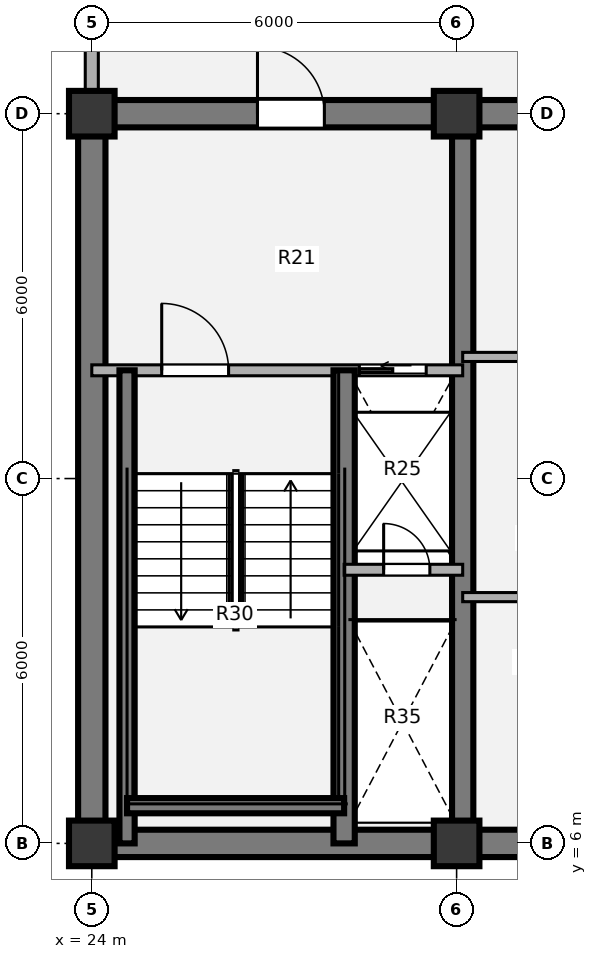
"""IFC4 building model, lengths in metres.
Left out: names, types, materials, properties, quantities, classifications, styles, units other than length and angle.
Written with IfcOpenShell. Run it as: python <this file> out.ifc"""

import sys

from ifc_helpers import new_model, si_unit, direction, frame, frame_2d, origin, origin_2d, place, context, subcontext, project, spatial, rectangle, extrude, source, transform, mapped, element, fill, save


model = new_model("IFC4")
c1 = context("Model", 3, precision=1e-05, world=origin(), true_north=direction((0.0, 1.0)))
c2 = subcontext(c1, "Body", "Model", "MODEL_VIEW")
j1 = project(units=[si_unit("LENGTHUNIT", "METRE"), si_unit("PLANEANGLEUNIT", "RADIAN")], contexts=[c1])
p1 = place(None, origin())
s1 = spatial("IfcSite", under=j1, at=p1, CompositionType="ELEMENT")
p2 = place(p1, origin())
s2 = spatial("IfcBuilding", under=s1, at=p2, CompositionType="ELEMENT")
p3 = place(p2, frame((0.0, 0.0, 182.88)))
s3 = spatial("IfcBuildingStorey", under=s2, at=p3, CompositionType="ELEMENT", Elevation=182.88)
m1 = source(origin(), c2, "Body", "SweptSolid", [
    extrude(rectangle(XDim=0.75, YDim=0.75, at=origin_2d()), origin(), (0.0, 0.0, 1.0), 3.78),
])
for number, where, z_axis, x_axis in (
    (1, (24.0, 6.0, 0.0), (0.0, 0.0, 1.0), (1.0, 0.0, 0.0)),
    (2, (30.0, 6.0, 0.0), (0.0, 0.0, 1.0), (1.0, 0.0, 0.0)),
    (3, (24.0, 18.0, 0.0), (0.0, 0.0, 1.0), (1.0, 0.0, 0.0)),
    (4, (30.0, 18.0, 0.0), (0.0, 0.0, 1.0), (1.0, 0.0, 0.0)),
):
    element("IfcColumn", number, at=place(p3, frame(where, z_axis=z_axis, x_axis=x_axis)), inside=s3, PredefinedType="COLUMN", context=c2, shape_type="MappedRepresentation", body=[
        mapped(m1, transform((0.0, 0.0, 0.0), x_axis=(1.0, 0.0, 0.0), y_axis=(0.0, 1.0, 0.0), z_axis=(0.0, 0.0, 1.0), scale=1.0)),
    ])
p4 = place(p3, frame((48.225, 6.0, 0.0), z_axis=(0.0, 0.0, 1.0), x_axis=(-1.0, 0.0, 0.0)))
e5 = element("IfcWall", 5, at=p4, inside=s3, PredefinedType="SHEAR", context=c2, shape_type="SweptSolid", body=[
    extrude(rectangle(XDim=24.45, YDim=0.45, at=frame_2d((12.225, 0.0))), origin(), (0.0, 0.0, 1.0), 3.78),
])
p5 = place(p3, frame((24.0, 6.0, 0.0), z_axis=(0.0, 0.0, 1.0), x_axis=(0.0, 1.0, 0.0)))
e6 = element("IfcWall", 6, at=p5, inside=s3, PredefinedType="SHEAR", context=c2, shape_type="SweptSolid", body=[
    extrude(rectangle(XDim=12.0, YDim=0.45, at=frame_2d((6.0, 0.0))), origin(), (0.0, 0.0, 1.0), 3.78),
])
p6 = place(p3, frame((23.775, 18.0, 0.0), z_axis=(0.0, 0.0, 1.0), x_axis=(1.0, 0.0, 0.0)))
e7 = element("IfcWall", 7, at=p6, inside=s3, PredefinedType="SHEAR", context=c2, shape_type="SweptSolid", body=[
    extrude(rectangle(XDim=9.425, YDim=0.45, at=frame_2d((4.712, 0.0))), origin(), (0.0, 0.0, 1.0), 3.78),
])
p7 = place(p6, frame((2.95, 0.0, 0.0)))
e8 = element("IfcOpeningElement", 8, at=p7, cuts=e7, PredefinedType="OPENING", context=c2, shape_type="SweptSolid", body=[
    extrude(rectangle(XDim=1.1, YDim=2.1, at=origin_2d()), frame((0.55, 0.235, 1.05), z_axis=(0.0, -1.0, 0.0), x_axis=(1.0, 0.0, 0.0)), (0.0, 0.0, 1.0), 0.47),
])
p8 = place(p3, frame((30.1, 6.0, 0.0), z_axis=(0.0, 0.0, 1.0), x_axis=(0.0, 1.0, 0.0)))
e9 = element("IfcWall", 9, at=p8, inside=s3, PredefinedType="SHEAR", context=c2, shape_type="SweptSolid", body=[
    extrude(rectangle(XDim=12.0, YDim=0.35, at=frame_2d((6.0, 0.0))), origin(), (0.0, 0.0, 1.0), 3.78),
])
p9 = place(p3, frame((24.0, 18.355, 0.0), z_axis=(0.0, 0.0, 1.0), x_axis=(0.0, 1.0, 0.0)))
e10 = element("IfcWall", 10, at=p9, inside=s3, PredefinedType="SOLIDWALL", context=c2, shape_type="SweptSolid", body=[
    extrude(rectangle(XDim=2.695, YDim=0.215, at=frame_2d((1.348, 0.0))), origin(), (0.0, 0.0, 1.0), 2.718),
])
for number, where, z_axis, x_axis in (
    (11, (30.1, 14.0, 0.0), (0.0, 0.0, 1.0), (1.0, 0.0, 0.0)),
    (12, (30.1, 10.05, 0.0), (0.0, 0.0, 1.0), (1.0, 0.0, 0.0)),
):
    element("IfcWall", number, at=place(p3, frame(where, z_axis=z_axis, x_axis=x_axis)), inside=s3, PredefinedType="PARTITIONING", context=c2, shape_type="SweptSolid", body=[
        extrude(rectangle(XDim=2.5, YDim=0.15, at=frame_2d((1.25, 0.0))), origin(), (0.0, 0.0, 1.0), 3.5),
    ])
p10 = place(p3, frame((24.0, 13.78, 0.0), z_axis=(0.0, 0.0, 1.0), x_axis=(1.0, 0.0, 0.0)))
e13 = element("IfcWall", 13, at=p10, inside=s3, PredefinedType="PARTITIONING", context=c2, shape_type="SweptSolid", body=[
    extrude(rectangle(XDim=6.1, YDim=0.18, at=frame_2d((3.05, 0.0))), origin(), (0.0, 0.0, 1.0), 3.5),
])
p11 = place(p10, frame((1.15, 0.0, 0.0)))
e14 = element("IfcOpeningElement", 14, at=p11, cuts=e13, PredefinedType="OPENING", context=c2, shape_type="SweptSolid", body=[
    extrude(rectangle(XDim=1.1, YDim=2.1, at=origin_2d()), frame((0.55, 0.1, 1.05), z_axis=(0.0, -1.0, 0.0), x_axis=(1.0, 0.0, 0.0)), (0.0, 0.0, 1.0), 0.2),
])
p12 = place(p10, frame((4.4, 0.0, 0.0)))
e15 = element("IfcOpeningElement", 15, at=p12, cuts=e13, PredefinedType="OPENING", context=c2, shape_type="SweptSolid", body=[
    extrude(rectangle(XDim=1.1, YDim=2.1, at=origin_2d()), frame((0.55, 0.1, 1.05), z_axis=(0.0, -1.0, 0.0), x_axis=(1.0, 0.0, 0.0)), (0.0, 0.0, 1.0), 0.2),
])
p13 = place(p3, frame((28.15, 6.0, 0.0), z_axis=(0.0, 0.0, 1.0), x_axis=(0.0, 1.0, 0.0)))
e16 = element("IfcWall", 16, at=p13, inside=s3, PredefinedType="SHEAR", context=c2, shape_type="SweptSolid", body=[
    extrude(rectangle(XDim=7.78, YDim=0.35, at=frame_2d((3.89, 0.0))), origin(), (0.0, 0.0, 1.0), 3.85),
])
p14 = place(p3, frame((24.58, 6.0, 0.0), z_axis=(0.0, 0.0, 1.0), x_axis=(0.0, 1.0, 0.0)))
e17 = element("IfcWall", 17, at=p14, inside=s3, PredefinedType="SHEAR", context=c2, shape_type="SweptSolid", body=[
    extrude(rectangle(XDim=7.78, YDim=0.25, at=frame_2d((3.89, 0.0))), origin(), (0.0, 0.0, 1.0), 3.85),
])
p15 = place(p3, frame((24.58, 6.62, 0.0), z_axis=(0.0, 0.0, 1.0), x_axis=(1.0, 0.0, 0.0)))
e18 = element("IfcWall", 18, at=p15, inside=s3, PredefinedType="SHEAR", context=c2, shape_type="SweptSolid", body=[
    extrude(rectangle(XDim=3.57, YDim=0.25, at=frame_2d((1.785, 0.0))), origin(), (0.0, 0.0, 1.0), 3.85),
])
p16 = place(p3, frame((28.15, 10.5, 0.0), z_axis=(0.0, 0.0, 1.0), x_axis=(1.0, 0.0, 0.0)))
e19 = element("IfcWall", 19, at=p16, inside=s3, PredefinedType="PARTITIONING", context=c2, shape_type="SweptSolid", body=[
    extrude(rectangle(XDim=1.95, YDim=0.18, at=frame_2d((0.975, 0.0))), origin(), (0.0, 0.0, 1.0), 3.5),
])
p17 = place(p16, frame((0.65, 0.0, 0.0)))
e20 = element("IfcOpeningElement", 20, at=p17, cuts=e19, PredefinedType="OPENING", context=c2, shape_type="SweptSolid", body=[
    extrude(rectangle(XDim=0.76, YDim=2.05, at=origin_2d()), frame((0.38, 0.1, 1.025), z_axis=(0.0, -1.0, 0.0), x_axis=(1.0, 0.0, 0.0)), (0.0, 0.0, 1.0), 0.2),
])
m2 = source(origin(), c2, "Body", "SweptSolid", [
    extrude(rectangle(XDim=1.1, YDim=2.1, at=origin_2d()), frame((0.55, 0.025, 1.05), z_axis=(0.0, -1.0, 0.0), x_axis=(1.0, 0.0, 0.0)), (0.0, 0.0, 1.0), 0.05),
])
p18 = place(p11, origin())
e21 = element("IfcDoor", 21, at=p18, inside=s3, OperationType="SINGLE_SWING_LEFT", PredefinedType="DOOR", context=c2, shape_type="MappedRepresentation", body=[
    mapped(m2, transform((0.0, 0.0, 0.0), x_axis=(1.0, 0.0, 0.0), y_axis=(0.0, 1.0, 0.0), z_axis=(0.0, 0.0, 1.0), scale=1.0)),
])
fill(e14, e21)
m3 = source(origin(), c2, "Body", "SweptSolid", [
    extrude(rectangle(XDim=1.1, YDim=2.1, at=origin_2d()), frame((0.55, 0.025, 1.05), z_axis=(0.0, -1.0, 0.0), x_axis=(1.0, 0.0, 0.0)), (0.0, 0.0, 1.0), 0.05),
])
p19 = place(p12, origin())
e22 = element("IfcDoor", 22, at=p19, inside=s3, OperationType="SLIDING_TO_LEFT", PredefinedType="DOOR", context=c2, shape_type="MappedRepresentation", body=[
    mapped(m3, transform((0.0, 0.0, 0.0), x_axis=(1.0, 0.0, 0.0), y_axis=(0.0, 1.0, 0.0), z_axis=(0.0, 0.0, 1.0), scale=1.0)),
])
fill(e15, e22)
m4 = source(origin(), c2, "Body", "SweptSolid", [
    extrude(rectangle(XDim=0.76, YDim=2.05, at=origin_2d()), frame((0.38, 0.025, 1.025), z_axis=(0.0, -1.0, 0.0), x_axis=(1.0, 0.0, 0.0)), (0.0, 0.0, 1.0), 0.05),
])
p20 = place(p17, origin())
e23 = element("IfcDoor", 23, at=p20, inside=s3, OperationType="SINGLE_SWING_LEFT", PredefinedType="DOOR", context=c2, shape_type="MappedRepresentation", body=[
    mapped(m4, transform((0.0, 0.0, 0.0), x_axis=(1.0, 0.0, 0.0), y_axis=(0.0, 1.0, 0.0), z_axis=(0.0, 0.0, 1.0), scale=1.0)),
])
fill(e20, e23)
m5 = source(origin(), c2, "Body", "SweptSolid", [
    extrude(rectangle(XDim=1.1, YDim=2.1, at=origin_2d()), frame((0.55, 0.025, 1.05), z_axis=(0.0, -1.0, 0.0), x_axis=(1.0, 0.0, 0.0)), (0.0, 0.0, 1.0), 0.05),
])
p21 = place(p7, origin())
e24 = element("IfcDoor", 24, at=p21, inside=s3, OperationType="SINGLE_SWING_LEFT", PredefinedType="DOOR", context=c2, shape_type="MappedRepresentation", body=[
    mapped(m5, transform((0.0, 0.0, 0.0), x_axis=(1.0, 0.0, 0.0), y_axis=(0.0, 1.0, 0.0), z_axis=(0.0, 0.0, 1.0), scale=1.0)),
])
fill(e8, e24)
save(model, sys.argv[1])
